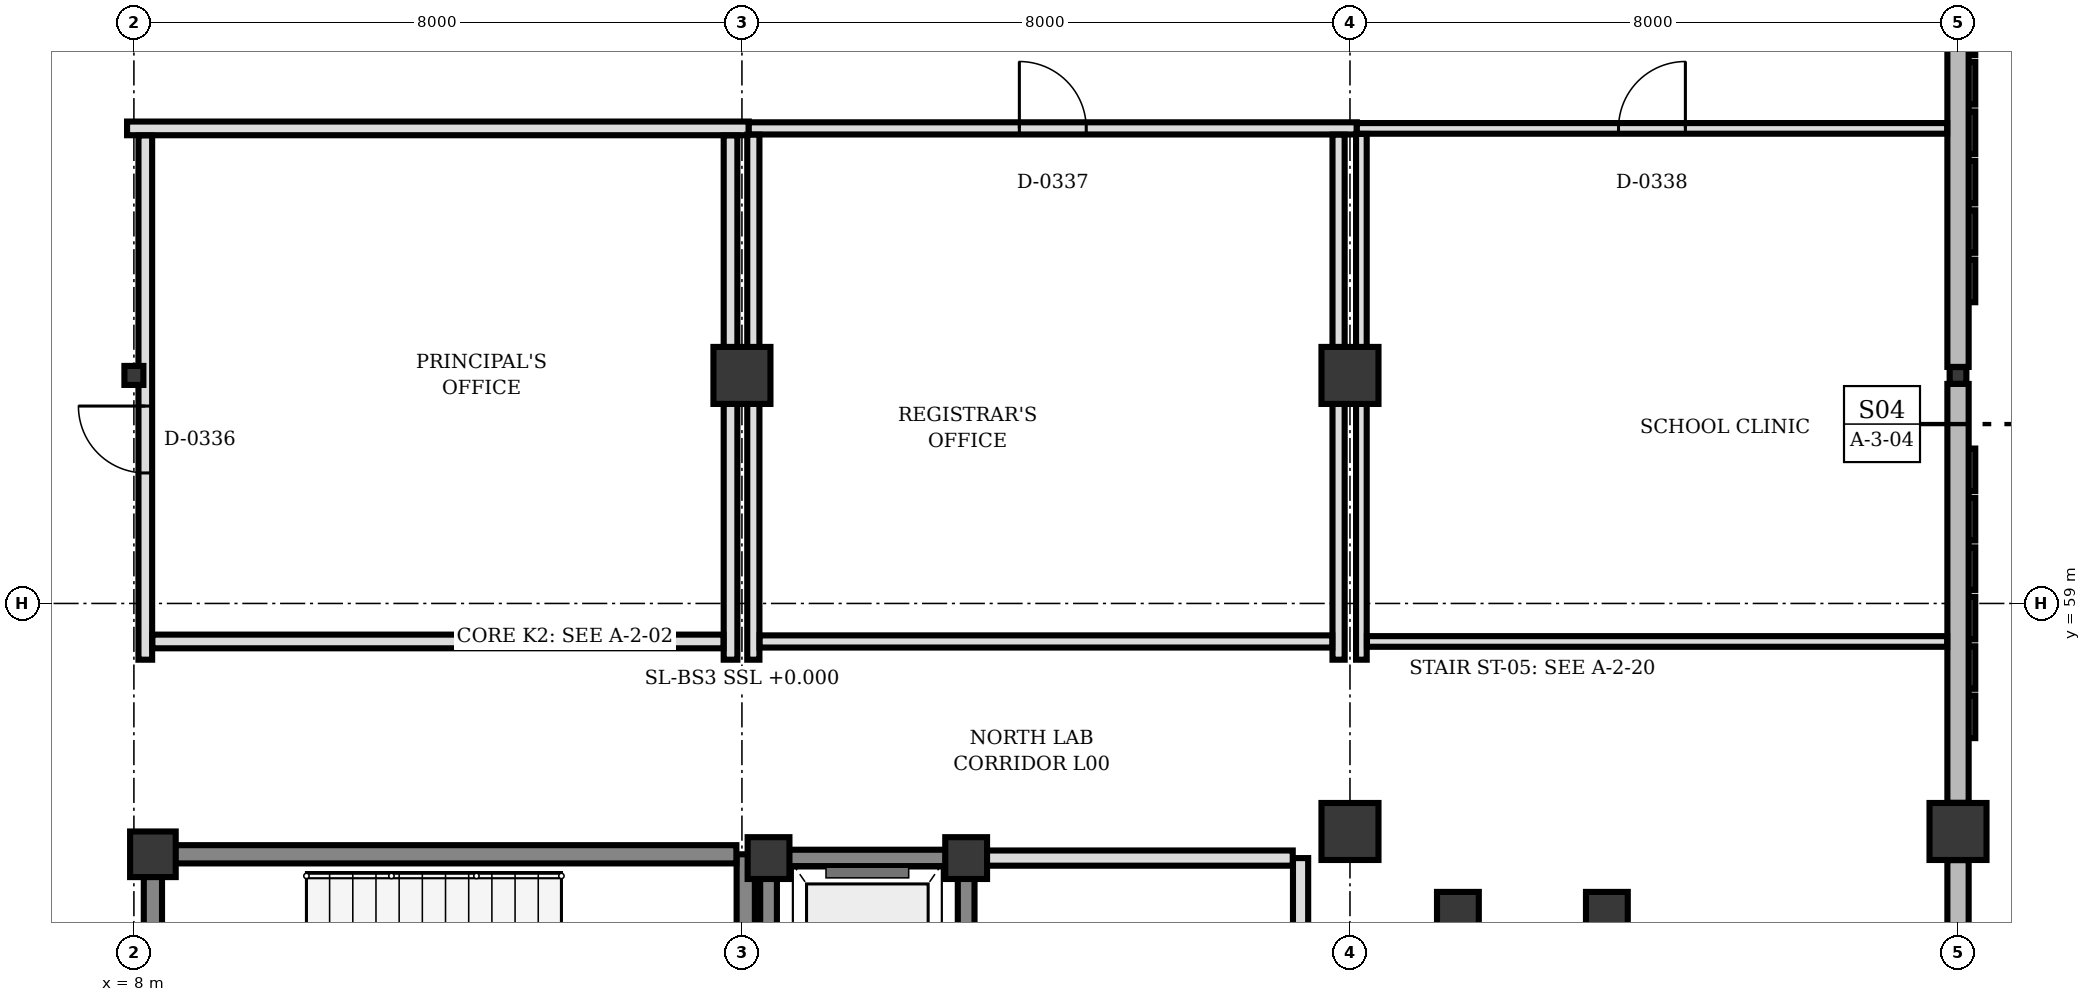
"""IFC4 building model, lengths in metres.
Left out: names, types, materials, properties, quantities, classifications, styles, units other than length and angle.
Written with IfcOpenShell. Run it as: python <this file> out.ifc"""

import sys

from ifc_helpers import new_model, si_unit, direction, frame, frame_2d, origin, origin_2d, place, context, subcontext, project, spatial, rectangle, hollow_rectangle, extrude, element, fill, save


model = new_model("IFC4")
c1 = context("Model", 3, precision=1e-05, world=origin(), true_north=direction((0.0, 1.0)))
c2 = subcontext(c1, "Body", "Model", "MODEL_VIEW")
j1 = project(units=[si_unit("LENGTHUNIT", "METRE"), si_unit("PLANEANGLEUNIT", "RADIAN")], contexts=[c1])
p1 = place(None, origin())
s1 = spatial("IfcSite", under=j1, at=p1, CompositionType="ELEMENT")
p2 = place(p1, origin())
s2 = spatial("IfcBuilding", under=s1, at=p2, CompositionType="ELEMENT")
p3 = place(p2, origin())
s3 = spatial("IfcBuildingStorey", under=s2, at=p3, CompositionType="ELEMENT", Elevation=0.0)
p4 = place(p3, frame((8.25, 55.7, 0.0), z_axis=(0.0, 0.0, 1.0), x_axis=(1.0, 0.0, 0.0)))
e1 = element("IfcColumn", 1, at=p4, inside=s3, PredefinedType="COLUMN", context=c2, shape_type="SweptSolid", body=[
    extrude(rectangle(XDim=0.6, YDim=0.6, at=origin_2d()), origin(), (0.0, 0.0, 1.0), 4.5),
])
for number, where, z_axis, x_axis in (
    (2, (25.42, 54.93, 0.0), (0.0, 0.0, 1.0), (1.0, 0.0, 0.0)),
    (3, (27.38, 54.93, 0.0), (0.0, 0.0, 1.0), (1.0, 0.0, 0.0)),
):
    element("IfcColumn", number, at=place(p3, frame(where, z_axis=z_axis, x_axis=x_axis)), inside=s3, PredefinedType="COLUMN", context=c2, shape_type="SweptSolid", body=[
        extrude(rectangle(XDim=0.55, YDim=0.55, at=origin_2d()), origin(), (0.0, 0.0, 1.0), 4.35),
    ])
for number, where, z_axis, x_axis in (
    (4, (18.95, 55.65, 0.0), (0.0, 0.0, 1.0), (1.0, 0.0, 0.0)),
    (5, (16.35, 55.65, 0.0), (0.0, 0.0, 1.0), (1.0, 0.0, 0.0)),
):
    element("IfcColumn", number, at=place(p3, frame(where, z_axis=z_axis, x_axis=x_axis)), inside=s3, PredefinedType="COLUMN", context=c2, shape_type="SweptSolid", body=[
        extrude(rectangle(XDim=0.55, YDim=0.55, at=origin_2d()), origin(), (0.0, 0.0, 1.0), 4.5),
    ])
for number, where, z_axis, x_axis in (
    (6, (16.0, 62.0, 0.0), (0.0, 0.0, 1.0), (1.0, 0.0, 0.0)),
    (7, (24.0, 56.0, 0.0), (0.0, 0.0, 1.0), (1.0, 0.0, 0.0)),
    (8, (24.0, 62.0, 0.0), (0.0, 0.0, 1.0), (1.0, 0.0, 0.0)),
    (9, (32.0, 56.0, 0.0), (0.0, 0.0, 1.0), (1.0, 0.0, 0.0)),
):
    element("IfcColumn", number, at=place(p3, frame(where, z_axis=z_axis, x_axis=x_axis)), inside=s3, PredefinedType="COLUMN", context=c2, shape_type="SweptSolid", body=[
        extrude(rectangle(XDim=0.75, YDim=0.75, at=origin_2d()), origin(), (0.0, 0.0, 1.0), 4.5),
    ])
p5 = place(p3, frame((32.0, 62.0, 0.0), z_axis=(0.0, 0.0, 1.0), x_axis=(1.0, 0.0, 0.0)))
e10 = element("IfcColumn", 10, at=p5, inside=s3, PredefinedType="COLUMN", context=c2, shape_type="SweptSolid", body=[
    extrude(hollow_rectangle(XDim=0.22, YDim=0.22, WallThickness=0.01, at=origin_2d()), origin(), (0.0, 0.0, 1.0), 4.5),
])
p6 = place(p3, frame((8.0, 62.0, 0.0), z_axis=(0.0, 0.0, 1.0), x_axis=(1.0, 0.0, 0.0)))
e11 = element("IfcColumn", 11, at=p6, inside=s3, PredefinedType="COLUMN", context=c2, shape_type="SweptSolid", body=[
    extrude(hollow_rectangle(XDim=0.25, YDim=0.25, WallThickness=0.01, at=origin_2d()), origin(), (0.0, 0.0, 1.0), 4.5),
])
for number, where, z_axis, x_axis in (
    (12, (32.0, 67.623, 0.0), (0.0, 0.0, 1.0), (0.0, -1.0, 0.0)),
    (13, (32.0, 61.888, 0.0), (0.0, 0.0, 1.0), (0.0, -1.0, 0.0)),
):
    element("IfcWall", number, at=place(p3, frame(where, z_axis=z_axis, x_axis=x_axis)), inside=s3, PredefinedType="SOLIDWALL", context=c2, shape_type="SweptSolid", body=[
        extrude(rectangle(XDim=5.511, YDim=0.28, at=frame_2d((2.755, 0.0))), origin(), (0.0, 0.0, 1.0), 3.382),
    ])
p7 = place(p3, frame((32.0, 55.623, 0.0), z_axis=(0.0, 0.0, 1.0), x_axis=(0.0, -1.0, 0.0)))
e14 = element("IfcWall", 14, at=p7, inside=s3, PredefinedType="SOLIDWALL", context=c2, shape_type="SweptSolid", body=[
    extrude(rectangle(XDim=7.511, YDim=0.28, at=frame_2d((3.755, 0.0))), origin(), (0.0, 0.0, 1.0), 3.55),
])
p8 = place(p7, frame((4.633, 0.0, 0.0)))
e15 = element("IfcOpeningElement", 15, at=p8, cuts=e14, PredefinedType="OPENING", context=c2, shape_type="SweptSolid", body=[
    extrude(rectangle(XDim=1.55, YDim=2.2, at=frame_2d((0.775, 1.1))), frame((0.0, 0.15, 0.0), z_axis=(0.0, -1.0, 0.0), x_axis=(1.0, 0.0, 0.0)), (0.0, 0.0, 1.0), 0.3),
])
p9 = place(p3, frame((8.25, 51.092, 0.0), z_axis=(0.0, 0.0, 1.0), x_axis=(0.0, 1.0, 0.0)))
e16 = element("IfcWall", 16, at=p9, inside=s3, PredefinedType="SHEAR", context=c2, shape_type="SweptSolid", body=[
    extrude(rectangle(XDim=4.316, YDim=0.24, at=frame_2d((2.158, 0.0))), origin(), (0.0, 0.0, 1.0), 4.24),
])
p10 = place(p3, frame((16.05, 55.7, 0.0), z_axis=(0.0, 0.0, 1.0), x_axis=(0.0, -1.0, 0.0)))
e17 = element("IfcWall", 17, at=p10, inside=s3, PredefinedType="SHEAR", context=c2, shape_type="SweptSolid", body=[
    extrude(rectangle(XDim=4.608, YDim=0.24, at=frame_2d((2.304, 0.0))), origin(), (0.0, 0.0, 1.0), 4.24),
])
p11 = place(p3, frame((15.927, 55.7, 0.0), z_axis=(0.0, 0.0, 1.0), x_axis=(-1.0, 0.0, 0.0)))
e18 = element("IfcWall", 18, at=p11, inside=s3, PredefinedType="SHEAR", context=c2, shape_type="SweptSolid", body=[
    extrude(rectangle(XDim=7.385, YDim=0.24, at=frame_2d((3.692, 0.0))), origin(), (0.0, 0.0, 1.0), 4.24),
])
p12 = place(p3, frame((18.95, 52.917, 0.0), z_axis=(0.0, 0.0, 1.0), x_axis=(0.0, 1.0, 0.0)))
e19 = element("IfcWall", 19, at=p12, inside=s3, PredefinedType="SHEAR", context=c2, shape_type="SweptSolid", body=[
    extrude(rectangle(XDim=2.466, YDim=0.22, at=frame_2d((1.233, 0.0))), origin(), (0.0, 0.0, 1.0), 4.24),
])
p13 = place(p12, frame((0.683, 0.0, 0.0)))
e20 = element("IfcOpeningElement", 20, at=p13, cuts=e19, PredefinedType="OPENING", context=c2, shape_type="SweptSolid", body=[
    extrude(rectangle(XDim=1.1, YDim=2.15, at=frame_2d((0.55, 1.075))), frame((0.0, 0.12, 0.0), z_axis=(0.0, -1.0, 0.0), x_axis=(1.0, 0.0, 0.0)), (0.0, 0.0, 1.0), 0.24),
])
p14 = place(p3, frame((18.683, 55.65, 0.0), z_axis=(0.0, 0.0, 1.0), x_axis=(-1.0, 0.0, 0.0)))
e21 = element("IfcWall", 21, at=p14, inside=s3, PredefinedType="SHEAR", context=c2, shape_type="SweptSolid", body=[
    extrude(rectangle(XDim=2.066, YDim=0.22, at=frame_2d((1.033, 0.0))), origin(), (0.0, 0.0, 1.0), 4.24),
])
p15 = place(p3, frame((16.35, 55.383, 0.0), z_axis=(0.0, 0.0, 1.0), x_axis=(0.0, -1.0, 0.0)))
e22 = element("IfcWall", 22, at=p15, inside=s3, PredefinedType="SHEAR", context=c2, shape_type="SweptSolid", body=[
    extrude(rectangle(XDim=2.466, YDim=0.22, at=frame_2d((1.233, 0.0))), origin(), (0.0, 0.0, 1.0), 4.24),
])
p16 = place(p3, frame((23.35, 50.85, 0.0), z_axis=(0.0, 0.0, 1.0), x_axis=(0.0, 1.0, 0.0)))
e23 = element("IfcWall", 23, at=p16, inside=s3, PredefinedType="PARTITIONING", context=c2, shape_type="SweptSolid", body=[
    extrude(rectangle(XDim=4.8, YDim=0.2, at=frame_2d((2.4, 0.0))), origin(), (0.0, 0.0, 1.0), 4.2),
])
p17 = place(p3, frame((19.217, 55.65, 0.0), z_axis=(0.0, 0.0, 1.0), x_axis=(1.0, 0.0, 0.0)))
e24 = element("IfcWall", 24, at=p17, inside=s3, PredefinedType="PARTITIONING", context=c2, shape_type="SweptSolid", body=[
    extrude(rectangle(XDim=4.03, YDim=0.2, at=frame_2d((2.015, 0.0))), origin(), (0.0, 0.0, 1.0), 4.2),
])
p18 = place(p3, frame((7.91, 65.25, 0.0), z_axis=(0.0, 0.0, 1.0), x_axis=(1.0, 0.0, 0.0)))
e25 = element("IfcWall", 25, at=p18, inside=s3, PredefinedType="PARTITIONING", context=c2, shape_type="SweptSolid", body=[
    extrude(rectangle(XDim=8.18, YDim=0.18, at=frame_2d((4.09, 0.0))), origin(), (0.0, 0.0, 1.0), 3.532),
])
p19 = place(p3, frame((15.85, 65.157, 0.0), z_axis=(0.0, 0.0, 1.0), x_axis=(0.0, -1.0, 0.0)))
e26 = element("IfcWall", 26, at=p19, inside=s3, PredefinedType="PARTITIONING", context=c2, shape_type="SweptSolid", body=[
    extrude(rectangle(XDim=2.79, YDim=0.18, at=frame_2d((1.395, 0.0))), origin(), (0.0, 0.0, 1.0), 3.632),
])
p20 = place(p3, frame((15.85, 61.633, 0.0), z_axis=(0.0, 0.0, 1.0), x_axis=(0.0, -1.0, 0.0)))
e27 = element("IfcWall", 27, at=p20, inside=s3, PredefinedType="PARTITIONING", context=c2, shape_type="SweptSolid", body=[
    extrude(rectangle(XDim=3.373, YDim=0.18, at=frame_2d((1.687, 0.0))), origin(), (0.0, 0.0, 1.0), 4.2),
])
p21 = place(p3, frame((8.15, 58.26, 0.0), z_axis=(0.0, 0.0, 1.0), x_axis=(0.0, 1.0, 0.0)))
e28 = element("IfcWall", 28, at=p21, inside=s3, PredefinedType="PARTITIONING", context=c2, shape_type="SweptSolid", body=[
    extrude(rectangle(XDim=6.897, YDim=0.18, at=frame_2d((3.448, 0.0))), origin(), (0.0, 0.0, 1.0), 3.382),
])
p22 = place(p21, frame((2.457, 0.0, 0.0)))
e29 = element("IfcOpeningElement", 29, at=p22, cuts=e28, PredefinedType="OPENING", context=c2, shape_type="SweptSolid", body=[
    extrude(rectangle(XDim=0.88, YDim=2.1, at=frame_2d((0.44, 1.05))), frame((0.0, 0.1, 0.0), z_axis=(0.0, -1.0, 0.0), x_axis=(1.0, 0.0, 0.0)), (0.0, 0.0, 1.0), 0.2),
])
p23 = place(p3, frame((15.757, 58.5, 0.0), z_axis=(0.0, 0.0, 1.0), x_axis=(-1.0, 0.0, 0.0)))
e30 = element("IfcWall", 30, at=p23, inside=s3, PredefinedType="PARTITIONING", context=c2, shape_type="SweptSolid", body=[
    extrude(rectangle(XDim=7.514, YDim=0.18, at=frame_2d((3.757, 0.0))), origin(), (0.0, 0.0, 1.0), 4.2),
])
p24 = place(p3, frame((16.09, 65.25, 0.0), z_axis=(0.0, 0.0, 1.0), x_axis=(1.0, 0.0, 0.0)))
e31 = element("IfcWall", 31, at=p24, inside=s3, PredefinedType="PARTITIONING", context=c2, shape_type="SweptSolid", body=[
    extrude(rectangle(XDim=8.0, YDim=0.16, at=frame_2d((4.0, 0.0))), origin(), (0.0, 0.0, 1.0), 3.532),
])
p25 = place(p24, frame((3.56, 0.0, 0.0)))
e32 = element("IfcOpeningElement", 32, at=p25, cuts=e31, PredefinedType="OPENING", context=c2, shape_type="SweptSolid", body=[
    extrude(rectangle(XDim=0.88, YDim=2.1, at=frame_2d((0.44, 1.05))), frame((0.0, 0.09, 0.0), z_axis=(0.0, -1.0, 0.0), x_axis=(1.0, 0.0, 0.0)), (0.0, 0.0, 1.0), 0.18),
])
p26 = place(p3, frame((23.85, 65.167, 0.0), z_axis=(0.0, 0.0, 1.0), x_axis=(0.0, -1.0, 0.0)))
e33 = element("IfcWall", 33, at=p26, inside=s3, PredefinedType="PARTITIONING", context=c2, shape_type="SweptSolid", body=[
    extrude(rectangle(XDim=2.8, YDim=0.16, at=frame_2d((1.4, 0.0))), origin(), (0.0, 0.0, 1.0), 3.532),
])
p27 = place(p3, frame((23.85, 61.633, 0.0), z_axis=(0.0, 0.0, 1.0), x_axis=(0.0, -1.0, 0.0)))
e34 = element("IfcWall", 34, at=p27, inside=s3, PredefinedType="PARTITIONING", context=c2, shape_type="SweptSolid", body=[
    extrude(rectangle(XDim=3.373, YDim=0.16, at=frame_2d((1.687, 0.0))), origin(), (0.0, 0.0, 1.0), 3.532),
])
p28 = place(p3, frame((16.15, 58.26, 0.0), z_axis=(0.0, 0.0, 1.0), x_axis=(0.0, 1.0, 0.0)))
e35 = element("IfcWall", 35, at=p28, inside=s3, PredefinedType="PARTITIONING", context=c2, shape_type="SweptSolid", body=[
    extrude(rectangle(XDim=3.373, YDim=0.16, at=frame_2d((1.687, 0.0))), origin(), (0.0, 0.0, 1.0), 4.2),
])
p29 = place(p3, frame((16.15, 62.367, 0.0), z_axis=(0.0, 0.0, 1.0), x_axis=(0.0, 1.0, 0.0)))
e36 = element("IfcWall", 36, at=p29, inside=s3, PredefinedType="PARTITIONING", context=c2, shape_type="SweptSolid", body=[
    extrude(rectangle(XDim=2.8, YDim=0.16, at=frame_2d((1.4, 0.0))), origin(), (0.0, 0.0, 1.0), 3.632),
])
p30 = place(p3, frame((23.767, 58.5, 0.0), z_axis=(0.0, 0.0, 1.0), x_axis=(-1.0, 0.0, 0.0)))
e37 = element("IfcWall", 37, at=p30, inside=s3, PredefinedType="PARTITIONING", context=c2, shape_type="SweptSolid", body=[
    extrude(rectangle(XDim=7.534, YDim=0.16, at=frame_2d((3.767, 0.0))), origin(), (0.0, 0.0, 1.0), 3.532),
])
p31 = place(p3, frame((24.09, 65.25, 0.0), z_axis=(0.0, 0.0, 1.0), x_axis=(1.0, 0.0, 0.0)))
e38 = element("IfcWall", 38, at=p31, inside=s3, PredefinedType="PARTITIONING", context=c2, shape_type="SweptSolid", body=[
    extrude(rectangle(XDim=7.767, YDim=0.14, at=frame_2d((3.883, 0.0))), origin(), (0.0, 0.0, 1.0), 3.532),
])
p32 = place(p31, frame((3.443, 0.0, 0.0)))
e39 = element("IfcOpeningElement", 39, at=p32, cuts=e38, PredefinedType="OPENING", context=c2, shape_type="SweptSolid", body=[
    extrude(rectangle(XDim=0.88, YDim=2.1, at=frame_2d((0.44, 1.05))), frame((0.0, 0.08, 0.0), z_axis=(0.0, -1.0, 0.0), x_axis=(1.0, 0.0, 0.0)), (0.0, 0.0, 1.0), 0.16),
])
p33 = place(p3, frame((24.15, 58.26, 0.0), z_axis=(0.0, 0.0, 1.0), x_axis=(0.0, 1.0, 0.0)))
e40 = element("IfcWall", 40, at=p33, inside=s3, PredefinedType="PARTITIONING", context=c2, shape_type="SweptSolid", body=[
    extrude(rectangle(XDim=3.373, YDim=0.14, at=frame_2d((1.687, 0.0))), origin(), (0.0, 0.0, 1.0), 3.532),
])
p34 = place(p3, frame((24.15, 62.367, 0.0), z_axis=(0.0, 0.0, 1.0), x_axis=(0.0, 1.0, 0.0)))
e41 = element("IfcWall", 41, at=p34, inside=s3, PredefinedType="PARTITIONING", context=c2, shape_type="SweptSolid", body=[
    extrude(rectangle(XDim=2.81, YDim=0.14, at=frame_2d((1.405, 0.0))), origin(), (0.0, 0.0, 1.0), 3.532),
])
p35 = place(p3, frame((31.857, 58.5, 0.0), z_axis=(0.0, 0.0, 1.0), x_axis=(-1.0, 0.0, 0.0)))
e42 = element("IfcWall", 42, at=p35, inside=s3, PredefinedType="PARTITIONING", context=c2, shape_type="SweptSolid", body=[
    extrude(rectangle(XDim=7.634, YDim=0.14, at=frame_2d((3.817, 0.0))), origin(), (0.0, 0.0, 1.0), 3.532),
])
p36 = place(p22, origin())
e43 = element("IfcDoor", 43, at=p36, inside=s3, OperationType="SINGLE_SWING_RIGHT", PredefinedType="DOOR", context=c2, shape_type="SweptSolid", body=[
    extrude(rectangle(XDim=0.88, YDim=2.1, at=frame_2d((0.44, 1.05))), frame((0.0, 0.025, 0.0), z_axis=(0.0, -1.0, 0.0), x_axis=(1.0, 0.0, 0.0)), (0.0, 0.0, 1.0), 0.05),
])
fill(e29, e43)
p37 = place(p25, origin())
e44 = element("IfcDoor", 44, at=p37, inside=s3, OperationType="SINGLE_SWING_LEFT", PredefinedType="DOOR", context=c2, shape_type="SweptSolid", body=[
    extrude(rectangle(XDim=0.88, YDim=2.1, at=frame_2d((0.44, 1.05))), frame((0.0, 0.025, 0.0), z_axis=(0.0, -1.0, 0.0), x_axis=(1.0, 0.0, 0.0)), (0.0, 0.0, 1.0), 0.05),
])
fill(e32, e44)
p38 = place(p32, origin())
e45 = element("IfcDoor", 45, at=p38, inside=s3, OperationType="SINGLE_SWING_RIGHT", PredefinedType="DOOR", context=c2, shape_type="SweptSolid", body=[
    extrude(rectangle(XDim=0.88, YDim=2.1, at=frame_2d((0.44, 1.05))), frame((0.0, 0.025, 0.0), z_axis=(0.0, -1.0, 0.0), x_axis=(1.0, 0.0, 0.0)), (0.0, 0.0, 1.0), 0.05),
])
fill(e39, e45)
save(model, sys.argv[1])
